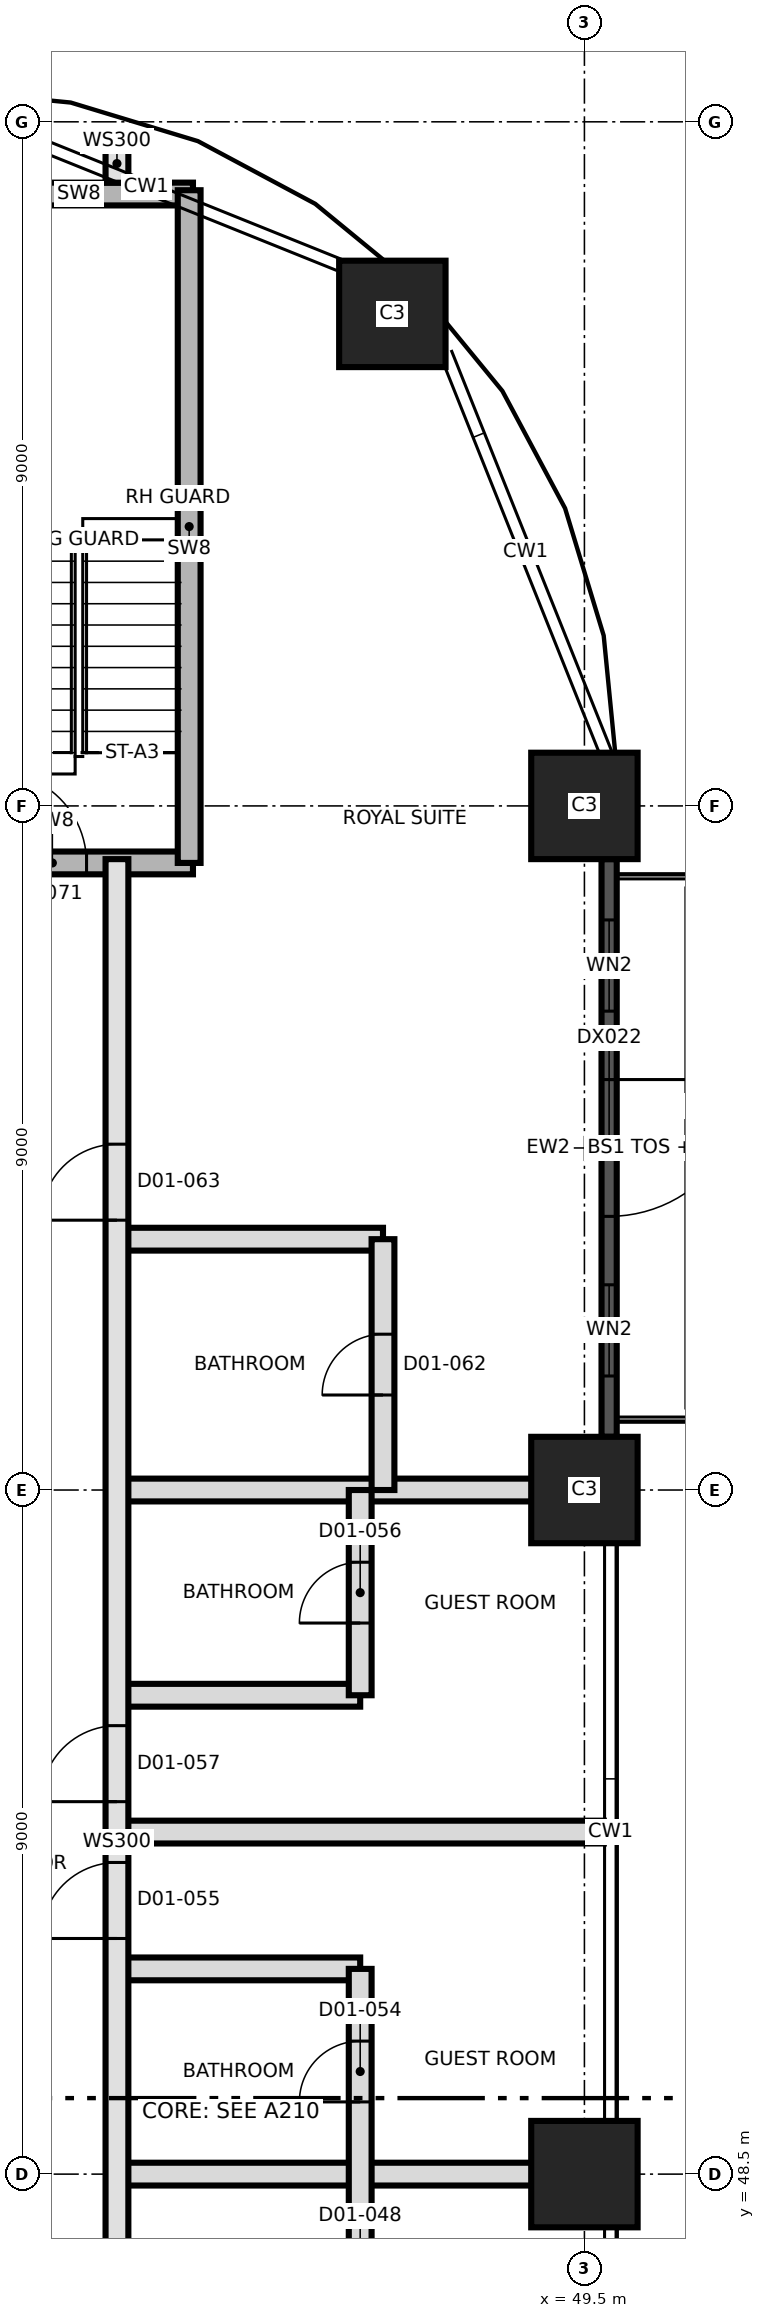
"""IFC4 building model, lengths in metres.
Left out: names, types, materials, properties, quantities, classifications, styles, units other than length and angle.
Written with IfcOpenShell. Run it as: python <this file> out.ifc"""

import sys

from ifc_helpers import new_model, si_unit, direction, frame, frame_2d, origin, origin_2d, place, context, subcontext, project, spatial, rectangle, extrude, element, fill, save


model = new_model("IFC4")
c1 = context("Model", 3, precision=1e-05, world=origin(), true_north=direction((0.0, 1.0)))
c2 = subcontext(c1, "Body", "Model", "MODEL_VIEW")
j1 = project(units=[si_unit("LENGTHUNIT", "METRE"), si_unit("PLANEANGLEUNIT", "RADIAN")], contexts=[c1])
p1 = place(None, origin())
s1 = spatial("IfcSite", under=j1, at=p1, CompositionType="ELEMENT")
p2 = place(p1, origin())
s2 = spatial("IfcBuilding", under=s1, at=p2, CompositionType="ELEMENT")
p3 = place(p2, frame((0.0, 0.0, 37.2)))
s3 = spatial("IfcBuildingStorey", under=s2, at=p3, CompositionType="ELEMENT", Elevation=37.2)
for number, where, z_axis, x_axis in (
    (1, (49.5, 48.5, 0.0), (0.0, 0.0, 1.0), (1.0, 0.0, 0.0)),
    (2, (49.5, 57.5, 0.0), (0.0, 0.0, 1.0), (1.0, 0.0, 0.0)),
    (3, (49.5, 66.5, 0.0), (0.0, 0.0, 1.0), (1.0, 0.0, 0.0)),
    (4, (46.973, 72.973, 0.0), (0.0, 0.0, 1.0), (1.0, 0.0, 0.0)),
):
    element("IfcColumn", number, at=place(p3, frame(where, z_axis=z_axis, x_axis=x_axis)), inside=s3, PredefinedType="COLUMN", context=c2, shape_type="SweptSolid", body=[
        extrude(rectangle(XDim=1.4, YDim=1.4, at=origin_2d()), origin(), (0.0, 0.0, 1.0), 3.7),
    ])
p4 = place(p3, frame((49.825, 65.8, 0.0), z_axis=(0.0, 0.0, 1.0), x_axis=(0.0, -1.0, 0.0)))
e5 = element("IfcWall", 5, at=p4, inside=s3, PredefinedType="SOLIDWALL", context=c2, shape_type="SweptSolid", body=[
    extrude(rectangle(XDim=7.6, YDim=0.2, at=frame_2d((3.8, 0.0))), origin(), (0.0, 0.0, 1.0), 2.7),
])
p5 = place(p4, frame((2.9, 0.0, 0.0)))
e6 = element("IfcOpeningElement", 6, at=p5, cuts=e5, PredefinedType="OPENING", context=c2, shape_type="SweptSolid", body=[
    extrude(rectangle(XDim=1.8, YDim=2.4, at=frame_2d((0.9, 1.2))), frame((0.0, 0.11, 0.0), z_axis=(0.0, -1.0, 0.0), x_axis=(1.0, 0.0, 0.0)), (0.0, 0.0, 1.0), 0.22),
])
p6 = place(p4, frame((5.6, 0.0, 0.9)))
e7 = element("IfcOpeningElement", 7, at=p6, cuts=e5, PredefinedType="OPENING", context=c2, shape_type="SweptSolid", body=[
    extrude(rectangle(XDim=1.2, YDim=2.1, at=frame_2d((0.6, 1.05))), frame((0.0, 0.11, 0.0), z_axis=(0.0, -1.0, 0.0), x_axis=(1.0, 0.0, 0.0)), (0.0, 0.0, 1.0), 0.22),
])
p7 = place(p4, frame((0.8, 0.0, 0.9)))
e8 = element("IfcOpeningElement", 8, at=p7, cuts=e5, PredefinedType="OPENING", context=c2, shape_type="SweptSolid", body=[
    extrude(rectangle(XDim=1.2, YDim=2.1, at=frame_2d((0.6, 1.05))), frame((0.0, 0.11, 0.0), z_axis=(0.0, -1.0, 0.0), x_axis=(1.0, 0.0, 0.0)), (0.0, 0.0, 1.0), 0.22),
])
p8 = place(p3, frame((43.35, 48.5, 0.0), z_axis=(0.0, 0.0, 1.0), x_axis=(1.0, 0.0, 0.0)))
e9 = element("IfcWall", 9, at=p8, inside=s3, PredefinedType="PARTITIONING", context=c2, shape_type="SweptSolid", body=[
    extrude(rectangle(XDim=6.225, YDim=0.3, at=frame_2d((3.112, 0.0))), origin(), (0.0, 0.0, 1.0), 3.4),
])
p9 = place(p3, frame((43.35, 51.2, 0.0), z_axis=(0.0, 0.0, 1.0), x_axis=(1.0, 0.0, 0.0)))
e10 = element("IfcWall", 10, at=p9, inside=s3, PredefinedType="PARTITIONING", context=c2, shape_type="SweptSolid", body=[
    extrude(rectangle(XDim=3.2, YDim=0.3, at=frame_2d((1.6, 0.0))), origin(), (0.0, 0.0, 1.0), 3.4),
])
p10 = place(p3, frame((43.35, 53.0, 0.0), z_axis=(0.0, 0.0, 1.0), x_axis=(1.0, 0.0, 0.0)))
e11 = element("IfcWall", 11, at=p10, inside=s3, PredefinedType="PARTITIONING", context=c2, shape_type="SweptSolid", body=[
    extrude(rectangle(XDim=6.405, YDim=0.3, at=frame_2d((3.202, 0.0))), origin(), (0.0, 0.0, 1.0), 3.4),
])
p11 = place(p3, frame((43.35, 54.8, 0.0), z_axis=(0.0, 0.0, 1.0), x_axis=(1.0, 0.0, 0.0)))
e12 = element("IfcWall", 12, at=p11, inside=s3, PredefinedType="PARTITIONING", context=c2, shape_type="SweptSolid", body=[
    extrude(rectangle(XDim=3.2, YDim=0.3, at=frame_2d((1.6, 0.0))), origin(), (0.0, 0.0, 1.0), 3.4),
])
p12 = place(p3, frame((43.35, 57.5, 0.0), z_axis=(0.0, 0.0, 1.0), x_axis=(1.0, 0.0, 0.0)))
e13 = element("IfcWall", 13, at=p12, inside=s3, PredefinedType="PARTITIONING", context=c2, shape_type="SweptSolid", body=[
    extrude(rectangle(XDim=6.225, YDim=0.3, at=frame_2d((3.112, 0.0))), origin(), (0.0, 0.0, 1.0), 3.4),
])
p13 = place(p3, frame((43.35, 60.8, 0.0), z_axis=(0.0, 0.0, 1.0), x_axis=(1.0, 0.0, 0.0)))
e14 = element("IfcWall", 14, at=p13, inside=s3, PredefinedType="PARTITIONING", context=c2, shape_type="SweptSolid", body=[
    extrude(rectangle(XDim=3.5, YDim=0.3, at=frame_2d((1.75, 0.0))), origin(), (0.0, 0.0, 1.0), 3.4),
])
p14 = place(p3, frame((40.65, 65.75, 0.0), z_axis=(0.0, 0.0, 1.0), x_axis=(1.0, 0.0, 0.0)))
e15 = element("IfcWall", 15, at=p14, inside=s3, PredefinedType="SHEAR", context=c2, shape_type="SweptSolid", body=[
    extrude(rectangle(XDim=3.7, YDim=0.3, at=frame_2d((1.85, 0.0))), origin(), (0.0, 0.0, 1.0), 3.4),
])
p15 = place(p14, frame((1.1, 0.0, 0.0)))
e16 = element("IfcOpeningElement", 16, at=p15, cuts=e15, PredefinedType="OPENING", context=c2, shape_type="SweptSolid", body=[
    extrude(rectangle(XDim=1.2, YDim=2.1, at=frame_2d((0.6, 1.05))), frame((0.0, 0.16, 0.0), z_axis=(0.0, -1.0, 0.0), x_axis=(1.0, 0.0, 0.0)), (0.0, 0.0, 1.0), 0.32),
])
p16 = place(p3, frame((41.35, 74.55, 0.0), z_axis=(0.0, 0.0, 1.0), x_axis=(1.0, 0.0, 0.0)))
e17 = element("IfcWall", 17, at=p16, inside=s3, PredefinedType="SHEAR", context=c2, shape_type="SweptSolid", body=[
    extrude(rectangle(XDim=3.0, YDim=0.3, at=frame_2d((1.5, 0.0))), origin(), (0.0, 0.0, 1.0), 3.4),
])
p17 = place(p3, frame((43.35, 39.95, 0.0), z_axis=(0.0, 0.0, 1.0), x_axis=(0.0, 1.0, 0.0)))
e18 = element("IfcWall", 18, at=p17, inside=s3, PredefinedType="SOLIDWALL", context=c2, shape_type="SweptSolid", body=[
    extrude(rectangle(XDim=25.85, YDim=0.3, at=frame_2d((12.925, 0.0))), origin(), (0.0, 0.0, 1.0), 3.4),
])
p18 = place(p17, frame((2.47, 0.0, 0.0)))
e19 = element("IfcOpeningElement", 19, at=p18, cuts=e18, PredefinedType="OPENING", context=c2, shape_type="SweptSolid", body=[
    extrude(rectangle(XDim=1.0, YDim=2.1, at=frame_2d((0.5, 1.05))), frame((0.0, 0.16, 0.0), z_axis=(0.0, -1.0, 0.0), x_axis=(1.0, 0.0, 0.0)), (0.0, 0.0, 1.0), 0.32),
])
p19 = place(p17, frame((4.27, 0.0, 0.0)))
e20 = element("IfcOpeningElement", 20, at=p19, cuts=e18, PredefinedType="OPENING", context=c2, shape_type="SweptSolid", body=[
    extrude(rectangle(XDim=1.0, YDim=2.1, at=frame_2d((0.5, 1.05))), frame((0.0, 0.16, 0.0), z_axis=(0.0, -1.0, 0.0), x_axis=(1.0, 0.0, 0.0)), (0.0, 0.0, 1.0), 0.32),
])
p20 = place(p17, frame((11.65, 0.0, 0.0)))
e21 = element("IfcOpeningElement", 21, at=p20, cuts=e18, PredefinedType="OPENING", context=c2, shape_type="SweptSolid", body=[
    extrude(rectangle(XDim=1.0, YDim=2.1, at=frame_2d((0.5, 1.05))), frame((0.0, 0.16, 0.0), z_axis=(0.0, -1.0, 0.0), x_axis=(1.0, 0.0, 0.0)), (0.0, 0.0, 1.0), 0.32),
])
p21 = place(p17, frame((13.45, 0.0, 0.0)))
e22 = element("IfcOpeningElement", 22, at=p21, cuts=e18, PredefinedType="OPENING", context=c2, shape_type="SweptSolid", body=[
    extrude(rectangle(XDim=1.0, YDim=2.1, at=frame_2d((0.5, 1.05))), frame((0.0, 0.16, 0.0), z_axis=(0.0, -1.0, 0.0), x_axis=(1.0, 0.0, 0.0)), (0.0, 0.0, 1.0), 0.32),
])
p22 = place(p17, frame((21.1, 0.0, 0.0)))
e23 = element("IfcOpeningElement", 23, at=p22, cuts=e18, PredefinedType="OPENING", context=c2, shape_type="SweptSolid", body=[
    extrude(rectangle(XDim=1.0, YDim=2.4, at=frame_2d((0.5, 1.2))), frame((0.0, 0.16, 0.0), z_axis=(0.0, -1.0, 0.0), x_axis=(1.0, 0.0, 0.0)), (0.0, 0.0, 1.0), 0.32),
])
p23 = place(p3, frame((43.35, 74.699, 0.0), z_axis=(0.0, 0.0, 1.0), x_axis=(0.0, 1.0, 0.0)))
e24 = element("IfcWall", 24, at=p23, inside=s3, PredefinedType="SOLIDWALL", context=c2, shape_type="SweptSolid", body=[
    extrude(rectangle(XDim=0.504, YDim=0.3, at=frame_2d((0.252, 0.0))), origin(), (0.0, 0.0, 1.0), 3.4),
])
p24 = place(p3, frame((44.3, 65.75, 0.0), z_axis=(0.0, 0.0, 1.0), x_axis=(0.0, 1.0, 0.0)))
e25 = element("IfcWall", 25, at=p24, inside=s3, PredefinedType="SHEAR", context=c2, shape_type="SweptSolid", body=[
    extrude(rectangle(XDim=8.85, YDim=0.3, at=frame_2d((4.425, 0.0))), origin(), (0.0, 0.0, 1.0), 3.4),
])
p25 = place(p3, frame((46.55, 45.8, 0.0), z_axis=(0.0, 0.0, 1.0), x_axis=(0.0, 1.0, 0.0)))
e26 = element("IfcWall", 26, at=p25, inside=s3, PredefinedType="PARTITIONING", context=c2, shape_type="SweptSolid", body=[
    extrude(rectangle(XDim=5.4, YDim=0.3, at=frame_2d((2.7, 0.0))), origin(), (0.0, 0.0, 1.0), 3.4),
])
p26 = place(p25, frame((0.95, 0.0, 0.0)))
e27 = element("IfcOpeningElement", 27, at=p26, cuts=e26, PredefinedType="OPENING", context=c2, shape_type="SweptSolid", body=[
    extrude(rectangle(XDim=0.8, YDim=2.1, at=frame_2d((0.4, 1.05))), frame((0.0, 0.16, 0.0), z_axis=(0.0, -1.0, 0.0), x_axis=(1.0, 0.0, 0.0)), (0.0, 0.0, 1.0), 0.32),
])
p27 = place(p25, frame((3.65, 0.0, 0.0)))
e28 = element("IfcOpeningElement", 28, at=p27, cuts=e26, PredefinedType="OPENING", context=c2, shape_type="SweptSolid", body=[
    extrude(rectangle(XDim=0.8, YDim=2.1, at=frame_2d((0.4, 1.05))), frame((0.0, 0.16, 0.0), z_axis=(0.0, -1.0, 0.0), x_axis=(1.0, 0.0, 0.0)), (0.0, 0.0, 1.0), 0.32),
])
p28 = place(p3, frame((46.55, 54.8, 0.0), z_axis=(0.0, 0.0, 1.0), x_axis=(0.0, 1.0, 0.0)))
e29 = element("IfcWall", 29, at=p28, inside=s3, PredefinedType="PARTITIONING", context=c2, shape_type="SweptSolid", body=[
    extrude(rectangle(XDim=2.7, YDim=0.3, at=frame_2d((1.35, 0.0))), origin(), (0.0, 0.0, 1.0), 3.4),
])
p29 = place(p28, frame((0.95, 0.0, 0.0)))
e30 = element("IfcOpeningElement", 30, at=p29, cuts=e29, PredefinedType="OPENING", context=c2, shape_type="SweptSolid", body=[
    extrude(rectangle(XDim=0.8, YDim=2.1, at=frame_2d((0.4, 1.05))), frame((0.0, 0.16, 0.0), z_axis=(0.0, -1.0, 0.0), x_axis=(1.0, 0.0, 0.0)), (0.0, 0.0, 1.0), 0.32),
])
p30 = place(p3, frame((46.85, 57.5, 0.0), z_axis=(0.0, 0.0, 1.0), x_axis=(0.0, 1.0, 0.0)))
e31 = element("IfcWall", 31, at=p30, inside=s3, PredefinedType="PARTITIONING", context=c2, shape_type="SweptSolid", body=[
    extrude(rectangle(XDim=3.3, YDim=0.3, at=frame_2d((1.65, 0.0))), origin(), (0.0, 0.0, 1.0), 3.4),
])
p31 = place(p30, frame((1.25, 0.0, 0.0)))
e32 = element("IfcOpeningElement", 32, at=p31, cuts=e31, PredefinedType="OPENING", context=c2, shape_type="SweptSolid", body=[
    extrude(rectangle(XDim=0.8, YDim=2.1, at=frame_2d((0.4, 1.05))), frame((0.0, 0.16, 0.0), z_axis=(0.0, -1.0, 0.0), x_axis=(1.0, 0.0, 0.0)), (0.0, 0.0, 1.0), 0.32),
])
p32 = place(p5, origin())
e33 = element("IfcDoor", 33, at=p32, inside=s3, OperationType="SINGLE_SWING_LEFT", PredefinedType="DOOR", context=c2, shape_type="SweptSolid", body=[
    extrude(rectangle(XDim=1.8, YDim=2.4, at=frame_2d((0.9, 1.2))), frame((0.0, 0.025, 0.0), z_axis=(0.0, -1.0, 0.0), x_axis=(1.0, 0.0, 0.0)), (0.0, 0.0, 1.0), 0.05),
])
fill(e6, e33)
p33 = place(p6, origin())
e34 = element("IfcWindow", 34, at=p33, inside=s3, PartitioningType="SINGLE_PANEL", PredefinedType="WINDOW", context=c2, shape_type="SweptSolid", body=[
    extrude(rectangle(XDim=1.2, YDim=2.1, at=frame_2d((0.6, 1.05))), frame((0.0, 0.03, 0.0), z_axis=(0.0, -1.0, 0.0), x_axis=(1.0, 0.0, 0.0)), (0.0, 0.0, 1.0), 0.06),
])
fill(e7, e34)
p34 = place(p7, origin())
e35 = element("IfcWindow", 35, at=p34, inside=s3, PartitioningType="SINGLE_PANEL", PredefinedType="WINDOW", context=c2, shape_type="SweptSolid", body=[
    extrude(rectangle(XDim=1.2, YDim=2.1, at=frame_2d((0.6, 1.05))), frame((0.0, 0.03, 0.0), z_axis=(0.0, -1.0, 0.0), x_axis=(1.0, 0.0, 0.0)), (0.0, 0.0, 1.0), 0.06),
])
fill(e8, e35)
p35 = place(p27, origin())
e36 = element("IfcDoor", 36, at=p35, inside=s3, OperationType="SINGLE_SWING_LEFT", PredefinedType="DOOR", context=c2, shape_type="SweptSolid", body=[
    extrude(rectangle(XDim=0.8, YDim=2.1, at=frame_2d((0.4, 1.05))), frame((0.0, 0.025, 0.0), z_axis=(0.0, -1.0, 0.0), x_axis=(1.0, 0.0, 0.0)), (0.0, 0.0, 1.0), 0.05),
])
fill(e28, e36)
p36 = place(p20, origin())
e37 = element("IfcDoor", 37, at=p36, inside=s3, OperationType="SINGLE_SWING_LEFT", PredefinedType="DOOR", context=c2, shape_type="SweptSolid", body=[
    extrude(rectangle(XDim=1.0, YDim=2.1, at=frame_2d((0.5, 1.05))), frame((0.0, 0.025, 0.0), z_axis=(0.0, -1.0, 0.0), x_axis=(1.0, 0.0, 0.0)), (0.0, 0.0, 1.0), 0.05),
])
fill(e21, e37)
p37 = place(p29, origin())
e38 = element("IfcDoor", 38, at=p37, inside=s3, OperationType="SINGLE_SWING_LEFT", PredefinedType="DOOR", context=c2, shape_type="SweptSolid", body=[
    extrude(rectangle(XDim=0.8, YDim=2.1, at=frame_2d((0.4, 1.05))), frame((0.0, 0.025, 0.0), z_axis=(0.0, -1.0, 0.0), x_axis=(1.0, 0.0, 0.0)), (0.0, 0.0, 1.0), 0.05),
])
fill(e30, e38)
p38 = place(p21, origin())
e39 = element("IfcDoor", 39, at=p38, inside=s3, OperationType="SINGLE_SWING_RIGHT", PredefinedType="DOOR", context=c2, shape_type="SweptSolid", body=[
    extrude(rectangle(XDim=1.0, YDim=2.1, at=frame_2d((0.5, 1.05))), frame((0.0, 0.025, 0.0), z_axis=(0.0, -1.0, 0.0), x_axis=(1.0, 0.0, 0.0)), (0.0, 0.0, 1.0), 0.05),
])
fill(e22, e39)
p39 = place(p31, origin())
e40 = element("IfcDoor", 40, at=p39, inside=s3, OperationType="SINGLE_SWING_LEFT", PredefinedType="DOOR", context=c2, shape_type="SweptSolid", body=[
    extrude(rectangle(XDim=0.8, YDim=2.1, at=frame_2d((0.4, 1.05))), frame((0.0, 0.025, 0.0), z_axis=(0.0, -1.0, 0.0), x_axis=(1.0, 0.0, 0.0)), (0.0, 0.0, 1.0), 0.05),
])
fill(e32, e40)
p40 = place(p22, origin())
e41 = element("IfcDoor", 41, at=p40, inside=s3, OperationType="SINGLE_SWING_RIGHT", PredefinedType="DOOR", context=c2, shape_type="SweptSolid", body=[
    extrude(rectangle(XDim=1.0, YDim=2.4, at=frame_2d((0.5, 1.2))), frame((0.0, 0.025, 0.0), z_axis=(0.0, -1.0, 0.0), x_axis=(1.0, 0.0, 0.0)), (0.0, 0.0, 1.0), 0.05),
])
fill(e23, e41)
p41 = place(p15, origin())
e42 = element("IfcDoor", 42, at=p41, inside=s3, OperationType="SINGLE_SWING_RIGHT", PredefinedType="DOOR", context=c2, shape_type="SweptSolid", body=[
    extrude(rectangle(XDim=1.2, YDim=2.1, at=frame_2d((0.6, 1.05))), frame((0.0, 0.025, 0.0), z_axis=(0.0, -1.0, 0.0), x_axis=(1.0, 0.0, 0.0)), (0.0, 0.0, 1.0), 0.05),
])
fill(e16, e42)
save(model, sys.argv[1])
